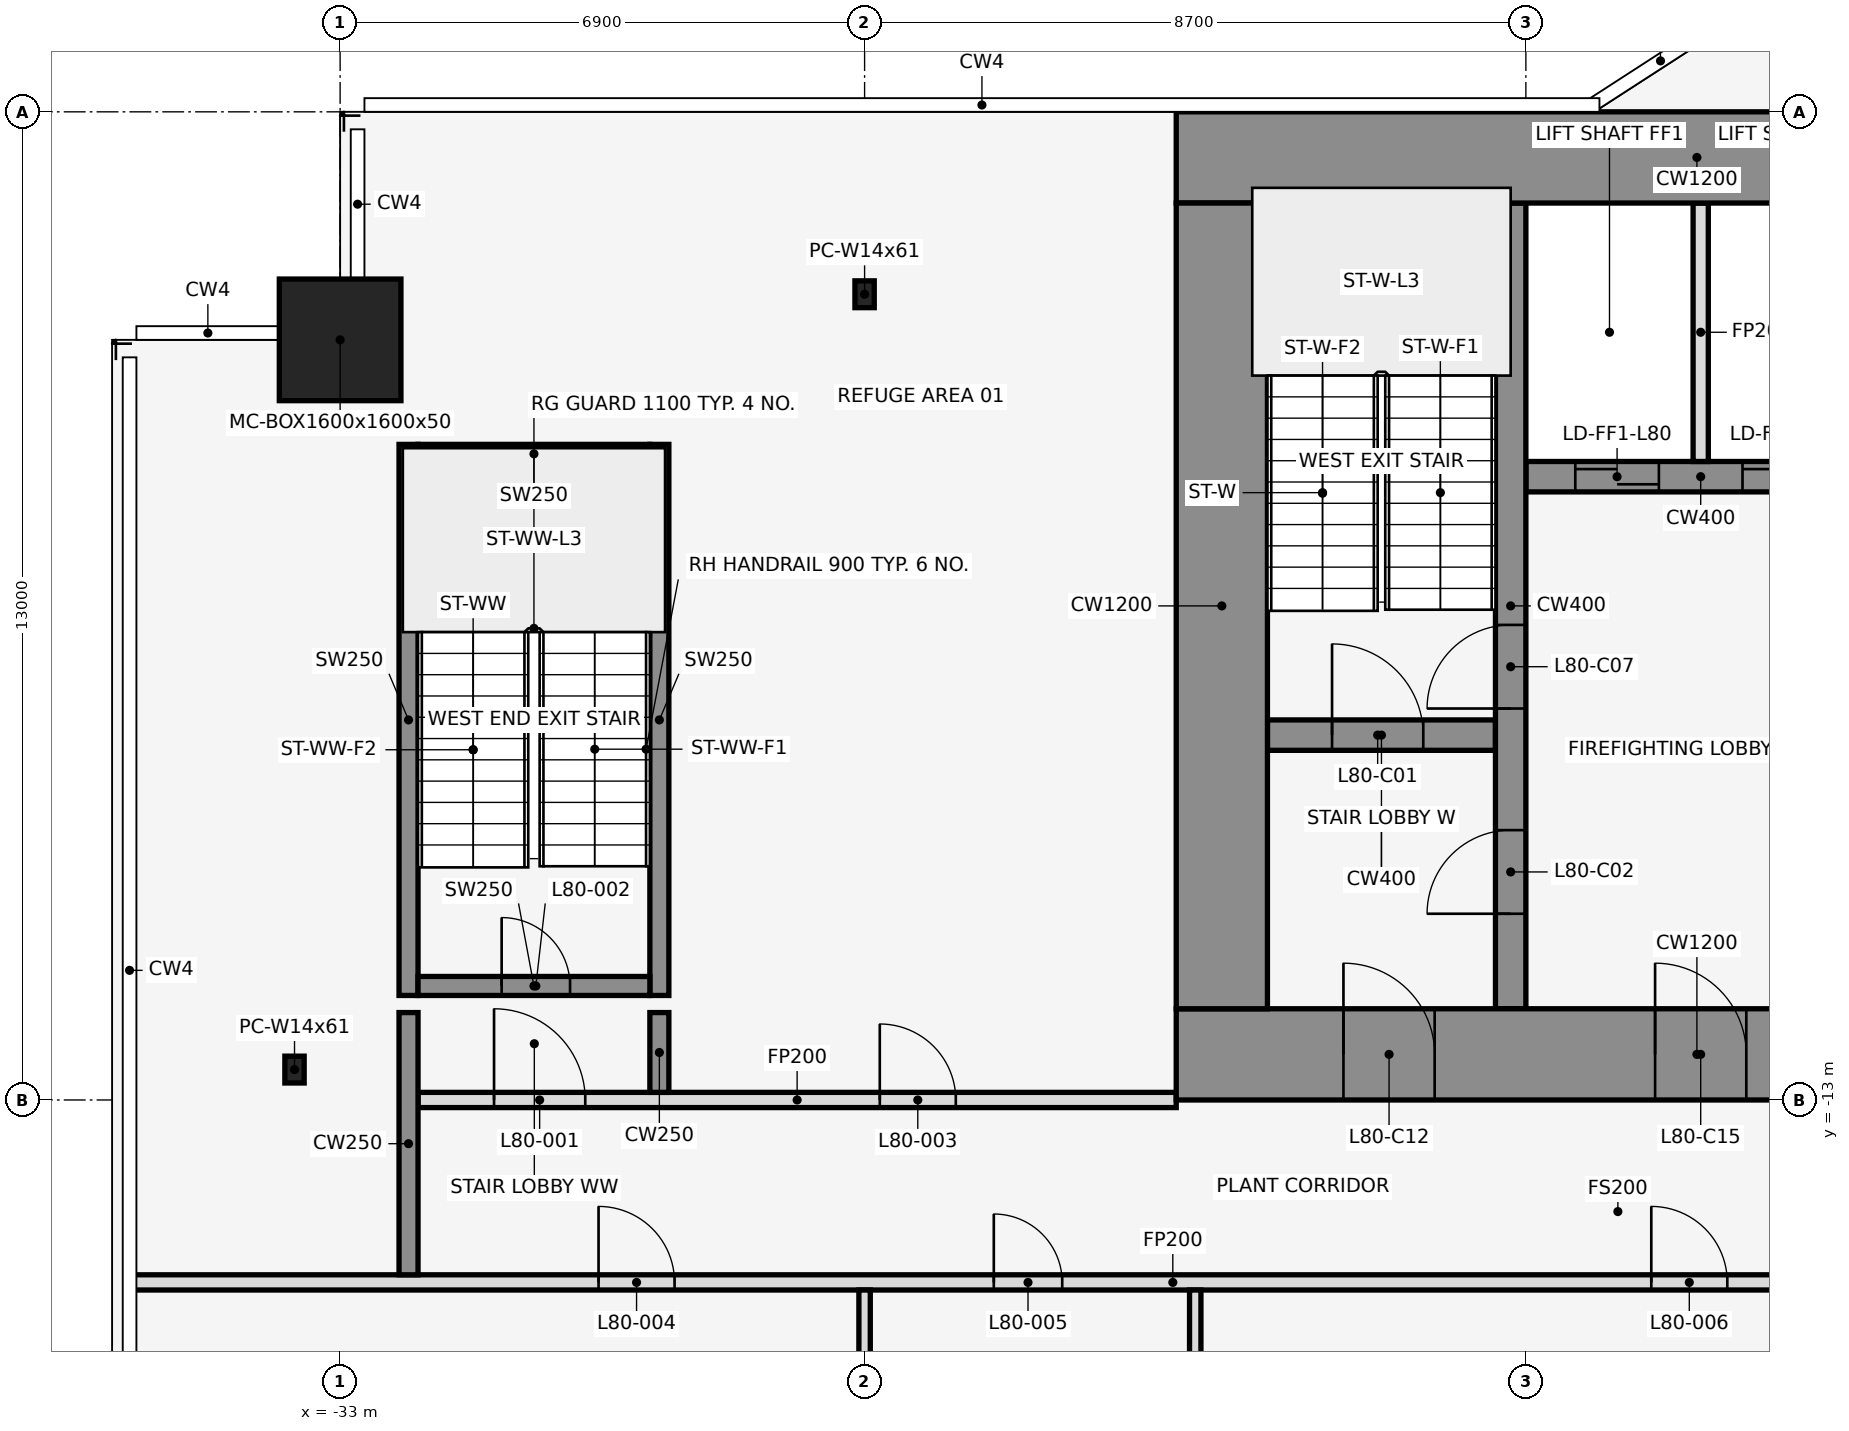
"""IFC4 building model, lengths in metres.
Left out: names, types, materials, properties, quantities, classifications, styles, units other than length and angle.
Written with IfcOpenShell. Run it as: python <this file> out.ifc"""

import sys

from ifc_helpers import new_model, si_unit, direction, frame, frame_2d, origin, origin_2d, place, context, subcontext, project, spatial, rectangle, hollow_rectangle, i_section, extrude, element, fill, save


model = new_model("IFC4")
c1 = context("Model", 3, precision=1e-05, world=origin(), true_north=direction((0.0, 1.0)))
c2 = subcontext(c1, "Body", "Model", "MODEL_VIEW")
j1 = project(units=[si_unit("LENGTHUNIT", "METRE"), si_unit("PLANEANGLEUNIT", "RADIAN")], contexts=[c1])
p1 = place(None, origin())
s1 = spatial("IfcSite", under=j1, at=p1, CompositionType="ELEMENT")
p2 = place(p1, origin())
s2 = spatial("IfcBuilding", under=s1, at=p2, CompositionType="ELEMENT")
p3 = place(p2, frame((0.0, 0.0, 356.9)))
s3 = spatial("IfcBuildingStorey", under=s2, at=p3, CompositionType="ELEMENT", Elevation=356.9)
p4 = place(p3, frame((-33.0, -3.0, 0.0), z_axis=(0.0, 0.0, 1.0), x_axis=(1.0, 0.0, 0.0)))
e1 = element("IfcColumn", 1, at=p4, inside=s3, PredefinedType="COLUMN", context=c2, shape_type="SweptSolid", body=[
    extrude(hollow_rectangle(XDim=1.6, YDim=1.6, WallThickness=0.05, at=origin_2d()), origin(), (0.0, 0.0, 1.0), 4.5),
])
for number, where, z_axis, x_axis in (
    (2, (-26.1, -2.4, 0.0), (0.0, 0.0, 1.0), (1.0, 0.0, 0.0)),
    (3, (-33.6, -12.6, 0.0), (0.0, 0.0, 1.0), (1.0, 0.0, 0.0)),
):
    element("IfcColumn", number, at=place(p3, frame(where, z_axis=z_axis, x_axis=x_axis)), inside=s3, PredefinedType="COLUMN", context=c2, shape_type="SweptSolid", body=[
        extrude(i_section(OverallWidth=0.254, OverallDepth=0.353, WebThickness=0.01, FlangeThickness=0.016, at=origin_2d()), origin(), (0.0, 0.0, 1.0), 4.5),
    ])
for number, where, z_axis, x_axis in (
    (4, (-32.1, -11.625, 0.0), (0.0, 0.0, 1.0), (0.0, 1.0, 0.0)),
    (5, (-28.8, -11.625, 0.0), (0.0, 0.0, 1.0), (0.0, 1.0, 0.0)),
):
    element("IfcWall", number, at=place(p3, frame(where, z_axis=z_axis, x_axis=x_axis)), inside=s3, PredefinedType="SHEAR", context=c2, shape_type="SweptSolid", body=[
        extrude(rectangle(XDim=7.25, YDim=0.25, at=frame_2d((3.625, 0.0))), origin(), (0.0, 0.0, 1.0), 4.5),
    ])
p5 = place(p3, frame((-31.975, -11.5, 0.0), z_axis=(0.0, 0.0, 1.0), x_axis=(1.0, 0.0, 0.0)))
e6 = element("IfcWall", 6, at=p5, inside=s3, PredefinedType="SHEAR", context=c2, shape_type="SweptSolid", body=[
    extrude(rectangle(XDim=3.05, YDim=0.25, at=frame_2d((1.525, 0.0))), origin(), (0.0, 0.0, 1.0), 4.5),
])
p6 = place(p5, frame((1.1, 0.0, 0.0)))
e7 = element("IfcOpeningElement", 7, at=p6, cuts=e6, PredefinedType="OPENING", context=c2, shape_type="SweptSolid", body=[
    extrude(rectangle(XDim=0.9, YDim=2.1, at=frame_2d((0.45, 1.05))), frame((0.0, 0.137, 0.0), z_axis=(0.0, -1.0, 0.0), x_axis=(1.0, 0.0, 0.0)), (0.0, 0.0, 1.0), 0.274),
])
p7 = place(p3, frame((-31.975, -4.5, 0.0), z_axis=(0.0, 0.0, 1.0), x_axis=(1.0, 0.0, 0.0)))
e8 = element("IfcWall", 8, at=p7, inside=s3, PredefinedType="SHEAR", context=c2, shape_type="SweptSolid", body=[
    extrude(rectangle(XDim=3.05, YDim=0.25, at=frame_2d((1.525, 0.0))), origin(), (0.0, 0.0, 1.0), 4.5),
])
p8 = place(p3, frame((-35.79, -15.4, 0.0), z_axis=(0.0, 0.0, 1.0), x_axis=(1.0, 0.0, 0.0)))
e9 = element("IfcWall", 9, at=p8, inside=s3, PredefinedType="PARTITIONING", context=c2, shape_type="SweptSolid", body=[
    extrude(rectangle(XDim=27.49, YDim=0.2, at=frame_2d((13.745, 0.0))), origin(), (0.0, 0.0, 1.0), 3.368),
])
p9 = place(p8, frame((6.19, 0.0, 0.0)))
e10 = element("IfcOpeningElement", 10, at=p9, cuts=e9, PredefinedType="OPENING", context=c2, shape_type="SweptSolid", body=[
    extrude(rectangle(XDim=1.0, YDim=2.1, at=frame_2d((0.5, 1.05))), frame((0.0, 0.112, 0.0), z_axis=(0.0, -1.0, 0.0), x_axis=(1.0, 0.0, 0.0)), (0.0, 0.0, 1.0), 0.224),
])
p10 = place(p8, frame((11.39, 0.0, 0.0)))
e11 = element("IfcOpeningElement", 11, at=p10, cuts=e9, PredefinedType="OPENING", context=c2, shape_type="SweptSolid", body=[
    extrude(rectangle(XDim=0.9, YDim=2.1, at=frame_2d((0.45, 1.05))), frame((0.0, 0.112, 0.0), z_axis=(0.0, -1.0, 0.0), x_axis=(1.0, 0.0, 0.0)), (0.0, 0.0, 1.0), 0.224),
])
p11 = place(p8, frame((20.04, 0.0, 0.0)))
e12 = element("IfcOpeningElement", 12, at=p11, cuts=e9, PredefinedType="OPENING", context=c2, shape_type="SweptSolid", body=[
    extrude(rectangle(XDim=1.0, YDim=2.1, at=frame_2d((0.5, 1.05))), frame((0.0, 0.112, 0.0), z_axis=(0.0, -1.0, 0.0), x_axis=(1.0, 0.0, 0.0)), (0.0, 0.0, 1.0), 0.224),
])
p12 = place(p3, frame((-31.975, -13.0, 0.0), z_axis=(0.0, 0.0, 1.0), x_axis=(1.0, 0.0, 0.0)))
e13 = element("IfcWall", 13, at=p12, inside=s3, PredefinedType="PARTITIONING", context=c2, shape_type="SweptSolid", body=[
    extrude(rectangle(XDim=9.975, YDim=0.2, at=frame_2d((4.988, 0.0))), origin(), (0.0, 0.0, 1.0), 3.368),
])
p13 = place(p12, frame((1.0, 0.0, 0.0)))
e14 = element("IfcOpeningElement", 14, at=p13, cuts=e13, PredefinedType="OPENING", context=c2, shape_type="SweptSolid", body=[
    extrude(rectangle(XDim=1.2, YDim=2.1, at=frame_2d((0.6, 1.05))), frame((0.0, 0.112, 0.0), z_axis=(0.0, -1.0, 0.0), x_axis=(1.0, 0.0, 0.0)), (0.0, 0.0, 1.0), 0.224),
])
p14 = place(p12, frame((6.075, 0.0, 0.0)))
e15 = element("IfcOpeningElement", 15, at=p14, cuts=e13, PredefinedType="OPENING", context=c2, shape_type="SweptSolid", body=[
    extrude(rectangle(XDim=1.0, YDim=2.1, at=frame_2d((0.5, 1.05))), frame((0.0, 0.112, 0.0), z_axis=(0.0, -1.0, 0.0), x_axis=(1.0, 0.0, 0.0)), (0.0, 0.0, 1.0), 0.224),
])
p15 = place(p3, frame((-32.1, -15.3, 0.0), z_axis=(0.0, 0.0, 1.0), x_axis=(0.0, 1.0, 0.0)))
e16 = element("IfcWall", 16, at=p15, inside=s3, PredefinedType="SHEAR", context=c2, shape_type="SweptSolid", body=[
    extrude(rectangle(XDim=3.45, YDim=0.25, at=frame_2d((1.725, 0.0))), origin(), (0.0, 0.0, 1.0), 4.5),
])
p16 = place(p3, frame((-28.8, -12.9, 0.0), z_axis=(0.0, 0.0, 1.0), x_axis=(0.0, 1.0, 0.0)))
e17 = element("IfcWall", 17, at=p16, inside=s3, PredefinedType="SHEAR", context=c2, shape_type="SweptSolid", body=[
    extrude(rectangle(XDim=1.05, YDim=0.25, at=frame_2d((0.525, 0.0))), origin(), (0.0, 0.0, 1.0), 4.5),
])
for number, where, z_axis, x_axis in (
    (18, (-26.1, -22.47, 0.0), (0.0, 0.0, 1.0), (0.0, 1.0, 0.0)),
    (19, (-21.75, -22.47, 0.0), (0.0, 0.0, 1.0), (0.0, 1.0, 0.0)),
):
    element("IfcWall", number, at=place(p3, frame(where, z_axis=z_axis, x_axis=x_axis)), inside=s3, PredefinedType="PARTITIONING", context=c2, shape_type="SweptSolid", body=[
        extrude(rectangle(XDim=6.97, YDim=0.15, at=frame_2d((3.485, 0.0))), origin(), (0.0, 0.0, 1.0), 3.368),
    ])
p17 = place(p3, frame((-20.8, -8.2, 0.0), z_axis=(0.0, 0.0, 1.0), x_axis=(1.0, 0.0, 0.0)))
e20 = element("IfcWall", 20, at=p17, inside=s3, PredefinedType="SHEAR", context=c2, shape_type="SweptSolid", body=[
    extrude(rectangle(XDim=3.0, YDim=0.4, at=frame_2d((1.5, 0.0))), origin(), (0.0, 0.0, 1.0), 4.5),
])
p18 = place(p17, frame((0.85, 0.0, 0.0)))
e21 = element("IfcOpeningElement", 21, at=p18, cuts=e20, PredefinedType="OPENING", context=c2, shape_type="SweptSolid", body=[
    extrude(rectangle(XDim=1.2, YDim=2.1, at=frame_2d((0.6, 1.05))), frame((0.0, 0.212, 0.0), z_axis=(0.0, -1.0, 0.0), x_axis=(1.0, 0.0, 0.0)), (0.0, 0.0, 1.0), 0.424),
])
p19 = place(p3, frame((-17.4, -4.8, 0.0), z_axis=(0.0, 0.0, 1.0), x_axis=(1.0, 0.0, 0.0)))
e22 = element("IfcWall", 22, at=p19, inside=s3, PredefinedType="SHEAR", context=c2, shape_type="SweptSolid", body=[
    extrude(rectangle(XDim=4.6, YDim=0.4, at=frame_2d((2.3, 0.0))), origin(), (0.0, 0.0, 1.0), 4.5),
])
p20 = place(p19, frame((0.65, 0.0, 0.0)))
e23 = element("IfcOpeningElement", 23, at=p20, cuts=e22, PredefinedType="OPENING", context=c2, shape_type="SweptSolid", body=[
    extrude(rectangle(XDim=1.1, YDim=2.1, at=frame_2d((0.55, 1.05))), frame((0.0, 0.212, 0.0), z_axis=(0.0, -1.0, 0.0), x_axis=(1.0, 0.0, 0.0)), (0.0, 0.0, 1.0), 0.424),
])
p21 = place(p19, frame((2.85, 0.0, 0.0)))
e24 = element("IfcOpeningElement", 24, at=p21, cuts=e22, PredefinedType="OPENING", context=c2, shape_type="SweptSolid", body=[
    extrude(rectangle(XDim=1.1, YDim=2.1, at=frame_2d((0.55, 1.05))), frame((0.0, 0.212, 0.0), z_axis=(0.0, -1.0, 0.0), x_axis=(1.0, 0.0, 0.0)), (0.0, 0.0, 1.0), 0.424),
])
p22 = place(p3, frame((-17.6, -11.8, 0.0), z_axis=(0.0, 0.0, 1.0), x_axis=(0.0, 1.0, 0.0)))
e25 = element("IfcWall", 25, at=p22, inside=s3, PredefinedType="SHEAR", context=c2, shape_type="SweptSolid", body=[
    extrude(rectangle(XDim=10.6, YDim=0.4, at=frame_2d((5.3, 0.0))), origin(), (0.0, 0.0, 1.0), 4.5),
])
p23 = place(p22, frame((1.25, 0.0, 0.0)))
e26 = element("IfcOpeningElement", 26, at=p23, cuts=e25, PredefinedType="OPENING", context=c2, shape_type="SweptSolid", body=[
    extrude(rectangle(XDim=1.1, YDim=2.1, at=frame_2d((0.55, 1.05))), frame((0.0, 0.212, 0.0), z_axis=(0.0, -1.0, 0.0), x_axis=(1.0, 0.0, 0.0)), (0.0, 0.0, 1.0), 0.424),
])
p24 = place(p22, frame((3.95, 0.0, 0.0)))
e27 = element("IfcOpeningElement", 27, at=p24, cuts=e25, PredefinedType="OPENING", context=c2, shape_type="SweptSolid", body=[
    extrude(rectangle(XDim=1.1, YDim=2.1, at=frame_2d((0.55, 1.05))), frame((0.0, 0.212, 0.0), z_axis=(0.0, -1.0, 0.0), x_axis=(1.0, 0.0, 0.0)), (0.0, 0.0, 1.0), 0.424),
])
p25 = place(p3, frame((-15.1, -4.6, 0.0), z_axis=(0.0, 0.0, 1.0), x_axis=(0.0, 1.0, 0.0)))
e28 = element("IfcWall", 28, at=p25, inside=s3, PredefinedType="PARTITIONING", context=c2, shape_type="SweptSolid", body=[
    extrude(rectangle(XDim=3.4, YDim=0.2, at=frame_2d((1.7, 0.0))), origin(), (0.0, 0.0, 1.0), 3.368),
])
p26 = place(p3, frame((-22.0, -0.6, 0.0), z_axis=(0.0, 0.0, 1.0), x_axis=(1.0, 0.0, 0.0)))
e29 = element("IfcWall", 29, at=p26, inside=s3, PredefinedType="SHEAR", context=c2, shape_type="SweptSolid", body=[
    extrude(rectangle(XDim=13.7, YDim=1.2, at=frame_2d((6.85, 0.0))), origin(), (0.0, 0.0, 1.0), 4.5),
])
p27 = place(p3, frame((-22.0, -12.4, 0.0), z_axis=(0.0, 0.0, 1.0), x_axis=(1.0, 0.0, 0.0)))
e30 = element("IfcWall", 30, at=p27, inside=s3, PredefinedType="SHEAR", context=c2, shape_type="SweptSolid", body=[
    extrude(rectangle(XDim=13.7, YDim=1.2, at=frame_2d((6.85, 0.0))), origin(), (0.0, 0.0, 1.0), 4.5),
])
p28 = place(p27, frame((2.2, 0.0, 0.0)))
e31 = element("IfcOpeningElement", 31, at=p28, cuts=e30, PredefinedType="OPENING", context=c2, shape_type="SweptSolid", body=[
    extrude(rectangle(XDim=1.2, YDim=2.1, at=frame_2d((0.6, 1.05))), frame((0.0, 0.612, 0.0), z_axis=(0.0, -1.0, 0.0), x_axis=(1.0, 0.0, 0.0)), (0.0, 0.0, 1.0), 1.224),
])
p29 = place(p27, frame((10.75, 0.0, 0.0)))
e32 = element("IfcOpeningElement", 32, at=p29, cuts=e30, PredefinedType="OPENING", context=c2, shape_type="SweptSolid", body=[
    extrude(rectangle(XDim=1.2, YDim=2.1, at=frame_2d((0.6, 1.05))), frame((0.0, 0.612, 0.0), z_axis=(0.0, -1.0, 0.0), x_axis=(1.0, 0.0, 0.0)), (0.0, 0.0, 1.0), 1.224),
])
p30 = place(p27, frame((6.3, 0.0, 0.0)))
e33 = element("IfcOpeningElement", 33, at=p30, cuts=e30, PredefinedType="OPENING", context=c2, shape_type="SweptSolid", body=[
    extrude(rectangle(XDim=1.2, YDim=2.1, at=frame_2d((0.6, 1.05))), frame((0.0, 0.612, 0.0), z_axis=(0.0, -1.0, 0.0), x_axis=(1.0, 0.0, 0.0)), (0.0, 0.0, 1.0), 1.224),
])
p31 = place(p3, frame((-21.4, -11.8, 0.0), z_axis=(0.0, 0.0, 1.0), x_axis=(0.0, 1.0, 0.0)))
e34 = element("IfcWall", 34, at=p31, inside=s3, PredefinedType="SHEAR", context=c2, shape_type="SweptSolid", body=[
    extrude(rectangle(XDim=10.6, YDim=1.2, at=frame_2d((5.3, 0.0))), origin(), (0.0, 0.0, 1.0), 4.5),
])
p32 = place(p13, origin())
e35 = element("IfcDoor", 35, at=p32, inside=s3, OperationType="SINGLE_SWING_LEFT", PredefinedType="DOOR", context=c2, shape_type="SweptSolid", body=[
    extrude(rectangle(XDim=1.2, YDim=2.1, at=frame_2d((0.6, 1.05))), frame((0.0, 0.025, 0.0), z_axis=(0.0, -1.0, 0.0), x_axis=(1.0, 0.0, 0.0)), (0.0, 0.0, 1.0), 0.05),
])
fill(e14, e35)
p33 = place(p6, origin())
e36 = element("IfcDoor", 36, at=p33, inside=s3, OperationType="SINGLE_SWING_LEFT", PredefinedType="DOOR", context=c2, shape_type="SweptSolid", body=[
    extrude(rectangle(XDim=0.9, YDim=2.1, at=frame_2d((0.45, 1.05))), frame((0.0, 0.025, 0.0), z_axis=(0.0, -1.0, 0.0), x_axis=(1.0, 0.0, 0.0)), (0.0, 0.0, 1.0), 0.05),
])
fill(e7, e36)
p34 = place(p14, origin())
e37 = element("IfcDoor", 37, at=p34, inside=s3, OperationType="SINGLE_SWING_RIGHT", PredefinedType="DOOR", context=c2, shape_type="SweptSolid", body=[
    extrude(rectangle(XDim=1.0, YDim=2.1, at=frame_2d((0.5, 1.05))), frame((0.0, 0.025, 0.0), z_axis=(0.0, -1.0, 0.0), x_axis=(1.0, 0.0, 0.0)), (0.0, 0.0, 1.0), 0.05),
])
fill(e15, e37)
p35 = place(p9, frame((1.0, 0.0, 0.0), z_axis=(0.0, 0.0, 1.0), x_axis=(-1.0, 0.0, 0.0)))
e38 = element("IfcDoor", 38, at=p35, inside=s3, OperationType="SINGLE_SWING_LEFT", PredefinedType="DOOR", context=c2, shape_type="SweptSolid", body=[
    extrude(rectangle(XDim=1.0, YDim=2.1, at=frame_2d((0.5, 1.05))), frame((0.0, 0.025, 0.0), z_axis=(0.0, -1.0, 0.0), x_axis=(1.0, 0.0, 0.0)), (0.0, 0.0, 1.0), 0.05),
])
fill(e10, e38)
p36 = place(p10, frame((0.9, 0.0, 0.0), z_axis=(0.0, 0.0, 1.0), x_axis=(-1.0, 0.0, 0.0)))
e39 = element("IfcDoor", 39, at=p36, inside=s3, OperationType="SINGLE_SWING_RIGHT", PredefinedType="DOOR", context=c2, shape_type="SweptSolid", body=[
    extrude(rectangle(XDim=0.9, YDim=2.1, at=frame_2d((0.45, 1.05))), frame((0.0, 0.025, 0.0), z_axis=(0.0, -1.0, 0.0), x_axis=(1.0, 0.0, 0.0)), (0.0, 0.0, 1.0), 0.05),
])
fill(e11, e39)
p37 = place(p11, frame((1.0, 0.0, 0.0), z_axis=(0.0, 0.0, 1.0), x_axis=(-1.0, 0.0, 0.0)))
e40 = element("IfcDoor", 40, at=p37, inside=s3, OperationType="SINGLE_SWING_RIGHT", PredefinedType="DOOR", context=c2, shape_type="SweptSolid", body=[
    extrude(rectangle(XDim=1.0, YDim=2.1, at=frame_2d((0.5, 1.05))), frame((0.0, 0.025, 0.0), z_axis=(0.0, -1.0, 0.0), x_axis=(1.0, 0.0, 0.0)), (0.0, 0.0, 1.0), 0.05),
])
fill(e12, e40)
p38 = place(p18, origin())
e41 = element("IfcDoor", 41, at=p38, inside=s3, OperationType="SINGLE_SWING_LEFT", PredefinedType="DOOR", context=c2, shape_type="SweptSolid", body=[
    extrude(rectangle(XDim=1.2, YDim=2.1, at=frame_2d((0.6, 1.05))), frame((0.0, 0.025, 0.0), z_axis=(0.0, -1.0, 0.0), x_axis=(1.0, 0.0, 0.0)), (0.0, 0.0, 1.0), 0.05),
])
fill(e21, e41)
p39 = place(p23, frame((1.1, 0.0, 0.0), z_axis=(0.0, 0.0, 1.0), x_axis=(-1.0, 0.0, 0.0)))
e42 = element("IfcDoor", 42, at=p39, inside=s3, OperationType="SINGLE_SWING_LEFT", PredefinedType="DOOR", context=c2, shape_type="SweptSolid", body=[
    extrude(rectangle(XDim=1.1, YDim=2.1, at=frame_2d((0.55, 1.05))), frame((0.0, 0.025, 0.0), z_axis=(0.0, -1.0, 0.0), x_axis=(1.0, 0.0, 0.0)), (0.0, 0.0, 1.0), 0.05),
])
fill(e26, e42)
p40 = place(p20, origin())
e43 = element("IfcDoor", 43, at=p40, inside=s3, OperationType="DOUBLE_DOOR_SLIDING", PredefinedType="DOOR", context=c2, shape_type="SweptSolid", body=[
    extrude(rectangle(XDim=1.1, YDim=2.1, at=frame_2d((0.55, 1.05))), frame((0.0, 0.025, 0.0), z_axis=(0.0, -1.0, 0.0), x_axis=(1.0, 0.0, 0.0)), (0.0, 0.0, 1.0), 0.05),
])
fill(e23, e43)
p41 = place(p21, origin())
e44 = element("IfcDoor", 44, at=p41, inside=s3, OperationType="DOUBLE_DOOR_SLIDING", PredefinedType="DOOR", context=c2, shape_type="SweptSolid", body=[
    extrude(rectangle(XDim=1.1, YDim=2.1, at=frame_2d((0.55, 1.05))), frame((0.0, 0.025, 0.0), z_axis=(0.0, -1.0, 0.0), x_axis=(1.0, 0.0, 0.0)), (0.0, 0.0, 1.0), 0.05),
])
fill(e24, e44)
p42 = place(p24, frame((1.1, 0.0, 0.0), z_axis=(0.0, 0.0, 1.0), x_axis=(-1.0, 0.0, 0.0)))
e45 = element("IfcDoor", 45, at=p42, inside=s3, OperationType="SINGLE_SWING_RIGHT", PredefinedType="DOOR", context=c2, shape_type="SweptSolid", body=[
    extrude(rectangle(XDim=1.1, YDim=2.1, at=frame_2d((0.55, 1.05))), frame((0.0, 0.025, 0.0), z_axis=(0.0, -1.0, 0.0), x_axis=(1.0, 0.0, 0.0)), (0.0, 0.0, 1.0), 0.05),
])
fill(e27, e45)
p43 = place(p28, frame((1.2, 0.0, 0.0), z_axis=(0.0, 0.0, 1.0), x_axis=(-1.0, 0.0, 0.0)))
e46 = element("IfcDoor", 46, at=p43, inside=s3, OperationType="SINGLE_SWING_RIGHT", PredefinedType="DOOR", context=c2, shape_type="SweptSolid", body=[
    extrude(rectangle(XDim=1.2, YDim=2.1, at=frame_2d((0.6, 1.05))), frame((0.0, 0.025, 0.0), z_axis=(0.0, -1.0, 0.0), x_axis=(1.0, 0.0, 0.0)), (0.0, 0.0, 1.0), 0.05),
])
fill(e31, e46)
p44 = place(p30, frame((1.2, 0.0, 0.0), z_axis=(0.0, 0.0, 1.0), x_axis=(-1.0, 0.0, 0.0)))
e47 = element("IfcDoor", 47, at=p44, inside=s3, OperationType="SINGLE_SWING_RIGHT", PredefinedType="DOOR", context=c2, shape_type="SweptSolid", body=[
    extrude(rectangle(XDim=1.2, YDim=2.1, at=frame_2d((0.6, 1.05))), frame((0.0, 0.025, 0.0), z_axis=(0.0, -1.0, 0.0), x_axis=(1.0, 0.0, 0.0)), (0.0, 0.0, 1.0), 0.05),
])
fill(e33, e47)
save(model, sys.argv[1])
